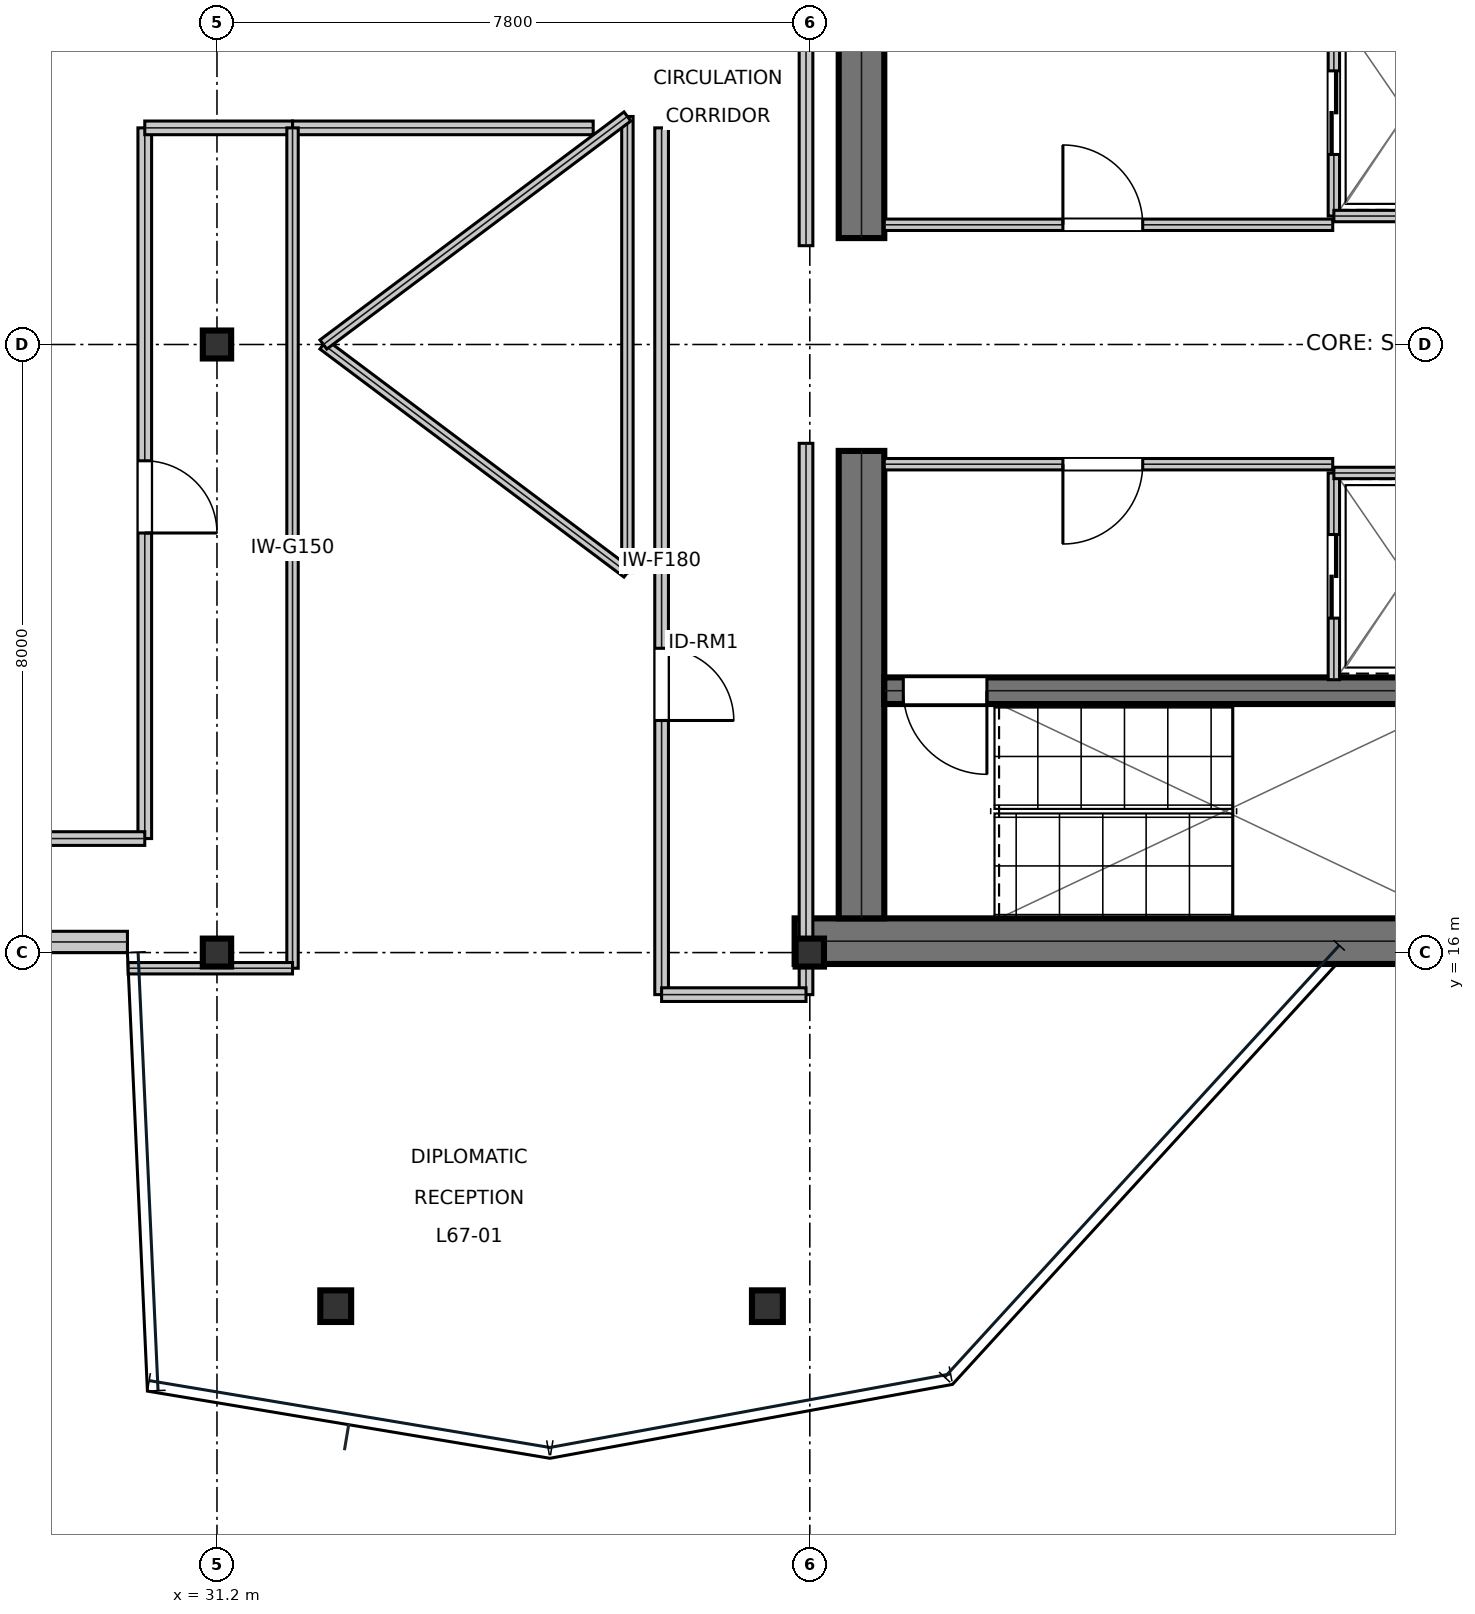
"""IFC4 building model, lengths in metres.
Left out: names, types, materials, properties, quantities, classifications, styles, units other than length and angle.
Written with IfcOpenShell. Run it as: python <this file> out.ifc"""

import sys

from ifc_helpers import new_model, si_unit, direction, frame, frame_2d, origin, origin_2d, place, context, subcontext, project, spatial, rectangle, i_section, extrude, element, fill, save


model = new_model("IFC4")
c1 = context("Model", 3, precision=1e-05, world=origin(), true_north=direction((0.0, 1.0)))
c2 = subcontext(c1, "Body", "Model", "MODEL_VIEW")
j1 = project(units=[si_unit("LENGTHUNIT", "METRE"), si_unit("PLANEANGLEUNIT", "RADIAN")], contexts=[c1])
p1 = place(None, origin())
s1 = spatial("IfcSite", under=j1, at=p1, CompositionType="ELEMENT")
p2 = place(p1, origin())
s2 = spatial("IfcBuilding", under=s1, at=p2, CompositionType="ELEMENT")
p3 = place(p2, frame((0.0, 0.0, 287.1)))
s3 = spatial("IfcBuildingStorey", under=s2, at=p3, CompositionType="ELEMENT", Elevation=287.1)
p4 = place(p3, frame((38.8, 16.15, 0.0), z_axis=(0.0, 0.0, 1.0), x_axis=(1.0, 0.0, 0.0)))
e1 = element("IfcWall", 1, at=p4, inside=s3, PredefinedType="SHEAR", context=c2, shape_type="SweptSolid", body=[
    extrude(rectangle(XDim=16.0, YDim=0.6, at=frame_2d((8.0, 0.0))), origin(), (0.0, 0.0, 1.0), 3.81),
])
for number, where, z_axis, x_axis in (
    (2, (39.68, 16.45, 0.0), (0.0, 0.0, 1.0), (0.0, 1.0, 0.0)),
    (3, (39.68, 25.4, 0.0), (0.0, 0.0, 1.0), (0.0, 1.0, 0.0)),
):
    element("IfcWall", number, at=place(p3, frame(where, z_axis=z_axis, x_axis=x_axis)), inside=s3, PredefinedType="SHEAR", context=c2, shape_type="SweptSolid", body=[
        extrude(rectangle(XDim=6.15, YDim=0.6, at=frame_2d((3.075, 0.0))), origin(), (0.0, 0.0, 1.0), 3.81),
    ])
p5 = place(p3, frame((39.98, 19.445, 0.0), z_axis=(0.0, 0.0, 1.0), x_axis=(1.0, 0.0, 0.0)))
e4 = element("IfcWall", 4, at=p5, inside=s3, PredefinedType="SHEAR", context=c2, shape_type="SweptSolid", body=[
    extrude(rectangle(XDim=7.71, YDim=0.35, at=frame_2d((3.855, 0.0))), origin(), (0.0, 0.0, 1.0), 3.81),
])
p6 = place(p5, frame((0.25, 0.0, 0.0)))
e5 = element("IfcOpeningElement", 5, at=p6, cuts=e4, PredefinedType="OPENING", context=c2, shape_type="SweptSolid", body=[
    extrude(rectangle(XDim=1.1, YDim=2.15, at=frame_2d((0.55, 1.075))), frame((0.0, 0.185, 0.0), z_axis=(0.0, -1.0, 0.0), x_axis=(1.0, 0.0, 0.0)), (0.0, 0.0, 1.0), 0.37),
])
for number, where, z_axis, x_axis in (
    (6, (31.2, 16.0, 0.0), (0.0, 0.0, 1.0), (1.0, 0.0, 0.0)),
    (7, (31.2, 24.0, 0.0), (0.0, 0.0, 1.0), (1.0, 0.0, 0.0)),
    (8, (39.0, 16.0, 0.0), (0.0, 0.0, 1.0), (1.0, 0.0, 0.0)),
):
    element("IfcColumn", number, at=place(p3, frame(where, z_axis=z_axis, x_axis=x_axis)), inside=s3, PredefinedType="COLUMN", context=c2, shape_type="SweptSolid", body=[
        extrude(i_section(OverallWidth=0.373, OverallDepth=0.368, WebThickness=0.015, FlangeThickness=0.024, at=origin_2d()), origin(), (0.0, 0.0, 1.0), 4.044),
    ])
p7 = place(p3, frame((32.762, 11.348, 0.016), z_axis=(0.013906647751, 0.029878037962, 0.999456806468), x_axis=(-0.906606370736, 0.421977355485, 0.0)))
e9 = element("IfcColumn", 9, at=p7, inside=s3, PredefinedType="COLUMN", context=c2, shape_type="SweptSolid", body=[
    extrude(i_section(OverallWidth=0.406, OverallDepth=0.416, WebThickness=0.03, FlangeThickness=0.048, at=origin_2d()), origin(), (0.0, 0.0, 1.0), 4.02),
])
p8 = place(p3, frame((38.442, 11.348, 0.016), z_axis=(-0.004919361467, 0.029880565948, 0.99954137066), x_axis=(-0.986717213658, -0.162447346151, 0.0)))
e10 = element("IfcColumn", 10, at=p8, inside=s3, PredefinedType="COLUMN", context=c2, shape_type="SweptSolid", body=[
    extrude(i_section(OverallWidth=0.406, OverallDepth=0.416, WebThickness=0.03, FlangeThickness=0.048, at=origin_2d()), origin(), (0.0, 0.0, 1.0), 4.02),
])
p9 = place(p3, frame((27.186, 16.14, 0.0), z_axis=(0.0, 0.0, 1.0), x_axis=(1.0, 0.0, 0.0)))
e11 = element("IfcWall", 11, at=p9, inside=s3, PredefinedType="STANDARD", context=c2, shape_type="SweptSolid", body=[
    extrude(rectangle(XDim=2.836, YDim=0.28, at=frame_2d((1.418, 0.0))), origin(), (0.0, 0.0, 1.0), 3.81),
])
p10 = place(p3, frame((39.98, 25.575, 0.0), z_axis=(0.0, 0.0, 1.0), x_axis=(1.0, 0.0, 0.0)))
e12 = element("IfcWall", 12, at=p10, inside=s3, PredefinedType="PARTITIONING", context=c2, shape_type="SweptSolid", body=[
    extrude(rectangle(XDim=5.9, YDim=0.15, at=frame_2d((2.95, 0.0))), origin(), (0.0, 0.0, 1.0), 3.81),
])
p11 = place(p10, frame((2.35, 0.0, 0.0)))
e13 = element("IfcOpeningElement", 13, at=p11, cuts=e12, PredefinedType="OPENING", context=c2, shape_type="SweptSolid", body=[
    extrude(rectangle(XDim=1.05, YDim=2.15, at=frame_2d((0.525, 1.075))), frame((0.0, 0.085, 0.0), z_axis=(0.0, -1.0, 0.0), x_axis=(1.0, 0.0, 0.0)), (0.0, 0.0, 1.0), 0.17),
])
p12 = place(p3, frame((39.98, 22.425, 0.0), z_axis=(0.0, 0.0, 1.0), x_axis=(1.0, 0.0, 0.0)))
e14 = element("IfcWall", 14, at=p12, inside=s3, PredefinedType="PARTITIONING", context=c2, shape_type="SweptSolid", body=[
    extrude(rectangle(XDim=5.9, YDim=0.15, at=frame_2d((2.95, 0.0))), origin(), (0.0, 0.0, 1.0), 3.81),
])
p13 = place(p12, frame((2.35, 0.0, 0.0)))
e15 = element("IfcOpeningElement", 15, at=p13, cuts=e14, PredefinedType="OPENING", context=c2, shape_type="SweptSolid", body=[
    extrude(rectangle(XDim=1.05, YDim=2.15, at=frame_2d((0.525, 1.075))), frame((0.0, 0.085, 0.0), z_axis=(0.0, -1.0, 0.0), x_axis=(1.0, 0.0, 0.0)), (0.0, 0.0, 1.0), 0.17),
])
p14 = place(p3, frame((45.895, 25.69, 0.0), z_axis=(0.0, 0.0, 1.0), x_axis=(0.0, 1.0, 0.0)))
e16 = element("IfcWall", 16, at=p14, inside=s3, PredefinedType="PARTITIONING", context=c2, shape_type="SweptSolid", body=[
    extrude(rectangle(XDim=2.72, YDim=0.15, at=frame_2d((1.36, 0.0))), origin(), (0.0, 0.0, 1.0), 3.81),
])
p15 = place(p14, frame((0.81, 0.0, 0.0)))
e17 = element("IfcOpeningElement", 17, at=p15, cuts=e16, PredefinedType="OPENING", context=c2, shape_type="SweptSolid", body=[
    extrude(rectangle(XDim=1.1, YDim=2.15, at=frame_2d((0.55, 1.075))), frame((0.0, 0.085, 0.0), z_axis=(0.0, -1.0, 0.0), x_axis=(1.0, 0.0, 0.0)), (0.0, 0.0, 1.0), 0.17),
])
p16 = place(p3, frame((45.895, 25.69, 0.0), z_axis=(0.0, 0.0, 1.0), x_axis=(1.0, 0.0, 0.0)))
e18 = element("IfcWall", 18, at=p16, inside=s3, PredefinedType="PARTITIONING", context=c2, shape_type="SweptSolid", body=[
    extrude(rectangle(XDim=1.915, YDim=0.15, at=frame_2d((0.958, 0.0))), origin(), (0.0, 0.0, 1.0), 3.81),
])
p17 = place(p3, frame((45.895, 19.59, 0.0), z_axis=(0.0, 0.0, 1.0), x_axis=(0.0, 1.0, 0.0)))
e19 = element("IfcWall", 19, at=p17, inside=s3, PredefinedType="PARTITIONING", context=c2, shape_type="SweptSolid", body=[
    extrude(rectangle(XDim=2.72, YDim=0.15, at=frame_2d((1.36, 0.0))), origin(), (0.0, 0.0, 1.0), 3.81),
])
p18 = place(p17, frame((0.81, 0.0, 0.0)))
e20 = element("IfcOpeningElement", 20, at=p18, cuts=e19, PredefinedType="OPENING", context=c2, shape_type="SweptSolid", body=[
    extrude(rectangle(XDim=1.1, YDim=2.15, at=frame_2d((0.55, 1.075))), frame((0.0, 0.085, 0.0), z_axis=(0.0, -1.0, 0.0), x_axis=(1.0, 0.0, 0.0)), (0.0, 0.0, 1.0), 0.17),
])
p19 = place(p3, frame((45.895, 22.31, 0.0), z_axis=(0.0, 0.0, 1.0), x_axis=(1.0, 0.0, 0.0)))
e21 = element("IfcWall", 21, at=p19, inside=s3, PredefinedType="PARTITIONING", context=c2, shape_type="SweptSolid", body=[
    extrude(rectangle(XDim=1.915, YDim=0.15, at=frame_2d((0.958, 0.0))), origin(), (0.0, 0.0, 1.0), 3.81),
])
p20 = place(p3, frame((37.05, 15.447, 0.0), z_axis=(0.0, 0.0, 1.0), x_axis=(0.0, 1.0, 0.0)))
e22 = element("IfcWall", 22, at=p20, inside=s3, PredefinedType="SOLIDWALL", context=c2, shape_type="SweptSolid", body=[
    extrude(rectangle(XDim=11.403, YDim=0.18, at=frame_2d((5.702, 0.0))), origin(), (0.0, 0.0, 1.0), 3.27),
])
p21 = place(p20, frame((3.607, 0.0, 0.0)))
e23 = element("IfcOpeningElement", 23, at=p21, cuts=e22, PredefinedType="OPENING", context=c2, shape_type="SweptSolid", body=[
    extrude(rectangle(XDim=0.95, YDim=2.15, at=frame_2d((0.475, 1.075))), frame((0.0, 0.1, 0.0), z_axis=(0.0, -1.0, 0.0), x_axis=(1.0, 0.0, 0.0)), (0.0, 0.0, 1.0), 0.2),
])
p22 = place(p3, frame((30.25, 17.5, 0.0), z_axis=(0.0, 0.0, 1.0), x_axis=(0.0, 1.0, 0.0)))
e24 = element("IfcWall", 24, at=p22, inside=s3, PredefinedType="SOLIDWALL", context=c2, shape_type="SweptSolid", body=[
    extrude(rectangle(XDim=9.35, YDim=0.18, at=frame_2d((4.675, 0.0))), origin(), (0.0, 0.0, 1.0), 3.27),
])
p23 = place(p22, frame((4.02, 0.0, 0.0)))
e25 = element("IfcOpeningElement", 25, at=p23, cuts=e24, PredefinedType="OPENING", context=c2, shape_type="SweptSolid", body=[
    extrude(rectangle(XDim=0.95, YDim=2.15, at=frame_2d((0.475, 1.075))), frame((0.0, 0.1, 0.0), z_axis=(0.0, -1.0, 0.0), x_axis=(1.0, 0.0, 0.0)), (0.0, 0.0, 1.0), 0.2),
])
p24 = place(p3, frame((38.95, 15.447, 0.0), z_axis=(0.0, 0.0, 1.0), x_axis=(0.0, 1.0, 0.0)))
e26 = element("IfcWall", 26, at=p24, inside=s3, PredefinedType="SOLIDWALL", context=c2, shape_type="SweptSolid", body=[
    extrude(rectangle(XDim=7.253, YDim=0.18, at=frame_2d((3.626, 0.0))), origin(), (0.0, 0.0, 1.0), 3.27),
])
p25 = place(p3, frame((32.194, 26.85, 0.0), z_axis=(0.0, 0.0, 1.0), x_axis=(1.0, 0.0, 0.0)))
e27 = element("IfcWall", 27, at=p25, inside=s3, PredefinedType="SOLIDWALL", context=c2, shape_type="SweptSolid", body=[
    extrude(rectangle(XDim=3.956, YDim=0.18, at=frame_2d((1.978, 0.0))), origin(), (0.0, 0.0, 1.0), 3.81),
])
p26 = place(p3, frame((37.05, 15.447, 0.0), z_axis=(0.0, 0.0, 1.0), x_axis=(1.0, 0.0, 0.0)))
e28 = element("IfcWall", 28, at=p26, inside=s3, PredefinedType="SOLIDWALL", context=c2, shape_type="SweptSolid", body=[
    extrude(rectangle(XDim=1.9, YDim=0.18, at=frame_2d((0.95, 0.0))), origin(), (0.0, 0.0, 1.0), 3.27),
])
p27 = place(p3, frame((30.25, 26.85, 0.0), z_axis=(0.0, 0.0, 1.0), x_axis=(1.0, 0.0, 0.0)))
e29 = element("IfcWall", 29, at=p27, inside=s3, PredefinedType="SOLIDWALL", context=c2, shape_type="SweptSolid", body=[
    extrude(rectangle(XDim=1.944, YDim=0.18, at=frame_2d((0.972, 0.0))), origin(), (0.0, 0.0, 1.0), 3.27),
])
p28 = place(p3, frame((28.55, 17.5, 0.0), z_axis=(0.0, 0.0, 1.0), x_axis=(1.0, 0.0, 0.0)))
e30 = element("IfcWall", 30, at=p28, inside=s3, PredefinedType="SOLIDWALL", context=c2, shape_type="SweptSolid", body=[
    extrude(rectangle(XDim=1.7, YDim=0.18, at=frame_2d((0.85, 0.0))), origin(), (0.0, 0.0, 1.0), 3.81),
])
p29 = place(p3, frame((38.95, 25.3, 0.0), z_axis=(0.0, 0.0, 1.0), x_axis=(0.0, 1.0, 0.0)))
e31 = element("IfcWall", 31, at=p29, inside=s3, PredefinedType="SOLIDWALL", context=c2, shape_type="SweptSolid", body=[
    extrude(rectangle(XDim=7.253, YDim=0.18, at=frame_2d((3.626, 0.0))), origin(), (0.0, 0.0, 1.0), 3.27),
])
p30 = place(p3, frame((32.194, 15.794, 0.0), z_axis=(0.0, 0.0, 1.0), x_axis=(0.0, 1.0, 0.0)))
e32 = element("IfcWall", 32, at=p30, inside=s3, PredefinedType="MOVABLE", context=c2, shape_type="SweptSolid", body=[
    extrude(rectangle(XDim=11.056, YDim=0.15, at=frame_2d((5.528, 0.0))), origin(), (0.0, 0.0, 1.0), 3.27),
])
p31 = place(p3, frame((30.031, 15.794, 0.0), z_axis=(0.0, 0.0, 1.0), x_axis=(1.0, 0.0, 0.0)))
e33 = element("IfcWall", 33, at=p31, inside=s3, PredefinedType="MOVABLE", context=c2, shape_type="SweptSolid", body=[
    extrude(rectangle(XDim=2.163, YDim=0.15, at=frame_2d((1.081, 0.0))), origin(), (0.0, 0.0, 1.0), 3.27),
])
p32 = place(p3, frame((32.6, 24.0, 0.0), z_axis=(0.0, 0.0, 1.0), x_axis=(0.8, -0.6, 0.0)))
e34 = element("IfcWall", 34, at=p32, inside=s3, PredefinedType="MOVABLE", context=c2, shape_type="SweptSolid", body=[
    extrude(rectangle(XDim=5.0, YDim=0.15, at=frame_2d((2.5, 0.0))), origin(), (0.0, 0.0, 1.0), 3.81),
])
p33 = place(p3, frame((36.6, 21.0, 0.0), z_axis=(0.0, 0.0, 1.0), x_axis=(0.0, 1.0, 0.0)))
e35 = element("IfcWall", 35, at=p33, inside=s3, PredefinedType="MOVABLE", context=c2, shape_type="SweptSolid", body=[
    extrude(rectangle(XDim=6.0, YDim=0.15, at=frame_2d((3.0, 0.0))), origin(), (0.0, 0.0, 1.0), 3.81),
])
p34 = place(p3, frame((36.6, 27.0, 0.0), z_axis=(0.0, 0.0, 1.0), x_axis=(-0.8, -0.6, 0.0)))
e36 = element("IfcWall", 36, at=p34, inside=s3, PredefinedType="MOVABLE", context=c2, shape_type="SweptSolid", body=[
    extrude(rectangle(XDim=5.0, YDim=0.15, at=frame_2d((2.5, 0.0))), origin(), (0.0, 0.0, 1.0), 3.81),
])
p35 = place(p11, origin())
e37 = element("IfcDoor", 37, at=p35, inside=s3, OperationType="SINGLE_SWING_LEFT", PredefinedType="DOOR", context=c2, shape_type="SweptSolid", body=[
    extrude(rectangle(XDim=1.05, YDim=2.15, at=frame_2d((0.525, 1.075))), frame((0.0, 0.025, 0.0), z_axis=(0.0, -1.0, 0.0), x_axis=(1.0, 0.0, 0.0)), (0.0, 0.0, 1.0), 0.05),
])
fill(e13, e37)
p36 = place(p13, frame((1.05, 0.0, 0.0), z_axis=(0.0, 0.0, 1.0), x_axis=(-1.0, 0.0, 0.0)))
e38 = element("IfcDoor", 38, at=p36, inside=s3, OperationType="SINGLE_SWING_RIGHT", PredefinedType="DOOR", context=c2, shape_type="SweptSolid", body=[
    extrude(rectangle(XDim=1.05, YDim=2.15, at=frame_2d((0.525, 1.075))), frame((0.0, 0.025, 0.0), z_axis=(0.0, -1.0, 0.0), x_axis=(1.0, 0.0, 0.0)), (0.0, 0.0, 1.0), 0.05),
])
fill(e15, e38)
p37 = place(p15, frame((1.1, 0.0, 0.0), z_axis=(0.0, 0.0, 1.0), x_axis=(-1.0, 0.0, 0.0)))
e39 = element("IfcDoor", 39, at=p37, inside=s3, OperationType="DOUBLE_DOOR_SLIDING", PredefinedType="DOOR", context=c2, shape_type="SweptSolid", body=[
    extrude(rectangle(XDim=1.1, YDim=2.15, at=frame_2d((0.55, 1.075))), frame((0.0, 0.025, 0.0), z_axis=(0.0, -1.0, 0.0), x_axis=(1.0, 0.0, 0.0)), (0.0, 0.0, 1.0), 0.05),
])
fill(e17, e39)
p38 = place(p18, frame((1.1, 0.0, 0.0), z_axis=(0.0, 0.0, 1.0), x_axis=(-1.0, 0.0, 0.0)))
e40 = element("IfcDoor", 40, at=p38, inside=s3, OperationType="DOUBLE_DOOR_SLIDING", PredefinedType="DOOR", context=c2, shape_type="SweptSolid", body=[
    extrude(rectangle(XDim=1.1, YDim=2.15, at=frame_2d((0.55, 1.075))), frame((0.0, 0.025, 0.0), z_axis=(0.0, -1.0, 0.0), x_axis=(1.0, 0.0, 0.0)), (0.0, 0.0, 1.0), 0.05),
])
fill(e20, e40)
p39 = place(p21, frame((0.95, 0.0, 0.0), z_axis=(0.0, 0.0, 1.0), x_axis=(-1.0, 0.0, 0.0)))
e41 = element("IfcDoor", 41, at=p39, inside=s3, OperationType="SINGLE_SWING_RIGHT", PredefinedType="DOOR", context=c2, shape_type="SweptSolid", body=[
    extrude(rectangle(XDim=0.95, YDim=2.15, at=frame_2d((0.475, 1.075))), frame((0.0, 0.025, 0.0), z_axis=(0.0, -1.0, 0.0), x_axis=(1.0, 0.0, 0.0)), (0.0, 0.0, 1.0), 0.05),
])
fill(e23, e41)
p40 = place(p23, frame((0.95, 0.0, 0.0), z_axis=(0.0, 0.0, 1.0), x_axis=(-1.0, 0.0, 0.0)))
e42 = element("IfcDoor", 42, at=p40, inside=s3, OperationType="SINGLE_SWING_RIGHT", PredefinedType="DOOR", context=c2, shape_type="SweptSolid", body=[
    extrude(rectangle(XDim=0.95, YDim=2.15, at=frame_2d((0.475, 1.075))), frame((0.0, 0.025, 0.0), z_axis=(0.0, -1.0, 0.0), x_axis=(1.0, 0.0, 0.0)), (0.0, 0.0, 1.0), 0.05),
])
fill(e25, e42)
p41 = place(p6, frame((1.1, 0.0, 0.0), z_axis=(0.0, 0.0, 1.0), x_axis=(-1.0, 0.0, 0.0)))
e43 = element("IfcDoor", 43, at=p41, inside=s3, OperationType="SINGLE_SWING_LEFT", PredefinedType="DOOR", context=c2, shape_type="SweptSolid", body=[
    extrude(rectangle(XDim=1.1, YDim=2.15, at=frame_2d((0.55, 1.075))), frame((0.0, 0.025, 0.0), z_axis=(0.0, -1.0, 0.0), x_axis=(1.0, 0.0, 0.0)), (0.0, 0.0, 1.0), 0.05),
])
fill(e5, e43)
save(model, sys.argv[1])
